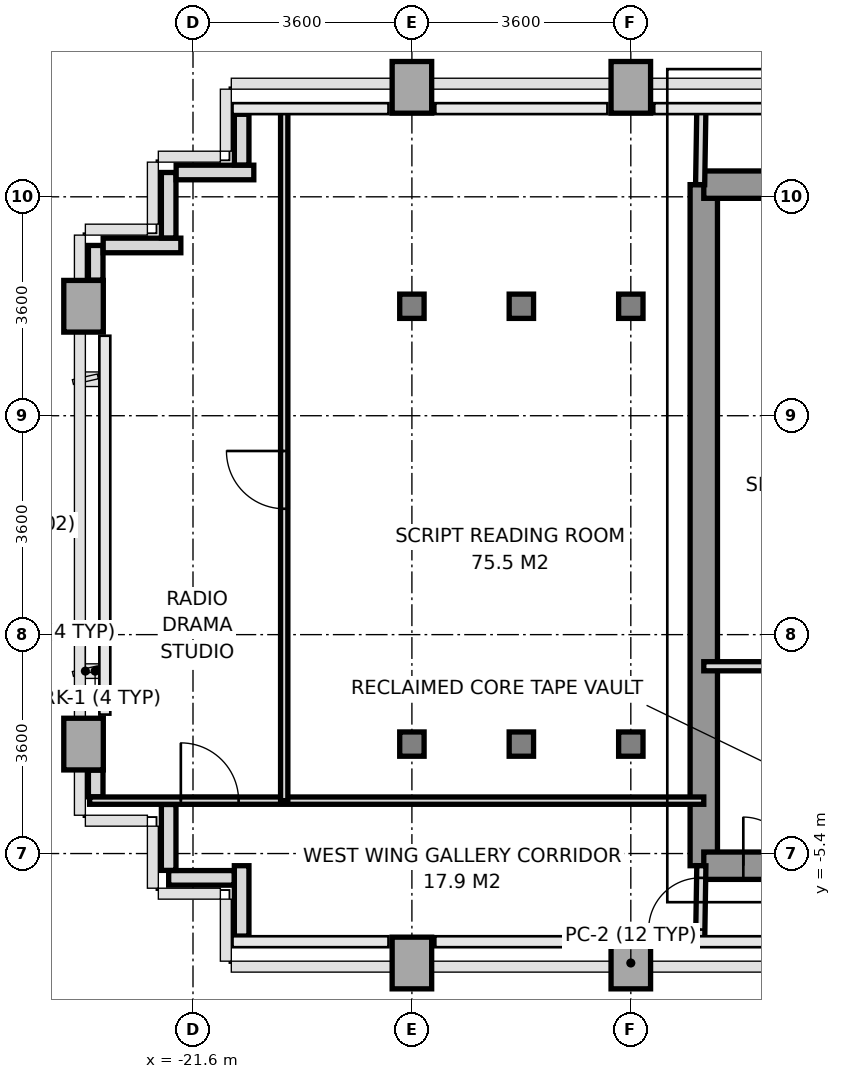
"""IFC4 building model, lengths in metres.
Left out: names, types, materials, properties, quantities, classifications, styles, units other than length and angle.
Written with IfcOpenShell. Run it as: python <this file> out.ifc"""

import sys

from ifc_helpers import new_model, si_unit, direction, frame, frame_2d, origin, origin_2d, place, context, subcontext, project, spatial, rectangle, i_section, extrude, source, transform, mapped, element, fill, save


model = new_model("IFC4")
c1 = context("Model", 3, precision=1e-05, world=origin(), true_north=direction((0.0, 1.0)))
c2 = subcontext(c1, "Body", "Model", "MODEL_VIEW")
j1 = project(units=[si_unit("LENGTHUNIT", "METRE"), si_unit("PLANEANGLEUNIT", "RADIAN")], contexts=[c1])
p1 = place(None, origin())
s1 = spatial("IfcSite", under=j1, at=p1, CompositionType="ELEMENT")
p2 = place(p1, origin())
s2 = spatial("IfcBuilding", under=s1, at=p2, CompositionType="ELEMENT")
p3 = place(p2, frame((0.0, 0.0, 114.2)))
s3 = spatial("IfcBuildingStorey", under=s2, at=p3, CompositionType="ELEMENT", Elevation=114.2)
m1 = source(origin(), c2, "Body", "SweptSolid", [
    extrude(rectangle(XDim=0.65, YDim=0.85, at=origin_2d()), origin(), (0.0, 0.0, 1.0), 3.2),
])
for number, where, z_axis, x_axis in (
    (1, (-23.4, -3.6, 0.0), (0.0, 0.0, 1.0), (1.0, 0.0, 0.0)),
    (2, (-23.4, 3.6, 0.0), (0.0, 0.0, 1.0), (1.0, 0.0, 0.0)),
    (3, (-18.0, -7.2, 0.0), (0.0, 0.0, 1.0), (1.0, 0.0, 0.0)),
):
    element("IfcColumn", number, at=place(p3, frame(where, z_axis=z_axis, x_axis=x_axis)), inside=s3, PredefinedType="COLUMN", context=c2, shape_type="MappedRepresentation", body=[
        mapped(m1, transform((0.0, 0.0, 0.0), x_axis=(1.0, 0.0, 0.0), y_axis=(0.0, 1.0, 0.0), z_axis=(0.0, 0.0, 1.0), scale=1.0)),
    ])
m2 = source(origin(), c2, "Body", "SweptSolid", [
    extrude(i_section(OverallWidth=0.401, OverallDepth=0.399, WebThickness=0.02, FlangeThickness=0.032, at=origin_2d()), origin(), (0.0, 0.0, 1.0), 3.2),
])
for number, where, z_axis, x_axis in (
    (4, (-18.0, -3.6, 0.0), (0.0, 0.0, 1.0), (1.0, 0.0, 0.0)),
    (5, (-18.0, 3.6, 0.0), (0.0, 0.0, 1.0), (1.0, 0.0, 0.0)),
):
    element("IfcColumn", number, at=place(p3, frame(where, z_axis=z_axis, x_axis=x_axis)), inside=s3, PredefinedType="COLUMN", context=c2, shape_type="MappedRepresentation", body=[
        mapped(m2, transform((0.0, 0.0, 0.0), x_axis=(1.0, 0.0, 0.0), y_axis=(0.0, 1.0, 0.0), z_axis=(0.0, 0.0, 1.0), scale=1.0)),
    ])
p4 = place(p3, frame((-18.0, 7.2, 0.0), z_axis=(0.0, 0.0, 1.0), x_axis=(1.0, 0.0, 0.0)))
e6 = element("IfcColumn", 6, at=p4, inside=s3, PredefinedType="COLUMN", context=c2, shape_type="MappedRepresentation", body=[
    mapped(m1, transform((0.0, 0.0, 0.0), x_axis=(1.0, 0.0, 0.0), y_axis=(0.0, 1.0, 0.0), z_axis=(0.0, 0.0, 1.0), scale=1.0)),
])
for number, where, z_axis, x_axis in (
    (7, (-16.2, -3.6, 0.0), (0.0, 0.0, 1.0), (1.0, 0.0, 0.0)),
    (8, (-16.2, 3.6, 0.0), (0.0, 0.0, 1.0), (1.0, 0.0, 0.0)),
):
    element("IfcColumn", number, at=place(p3, frame(where, z_axis=z_axis, x_axis=x_axis)), inside=s3, PredefinedType="COLUMN", context=c2, shape_type="MappedRepresentation", body=[
        mapped(m2, transform((0.0, 0.0, 0.0), x_axis=(1.0, 0.0, 0.0), y_axis=(0.0, 1.0, 0.0), z_axis=(0.0, 0.0, 1.0), scale=1.0)),
    ])
p5 = place(p3, frame((-14.4, -7.2, 0.0), z_axis=(0.0, 0.0, 1.0), x_axis=(1.0, 0.0, 0.0)))
e9 = element("IfcColumn", 9, at=p5, inside=s3, PredefinedType="COLUMN", context=c2, shape_type="MappedRepresentation", body=[
    mapped(m1, transform((0.0, 0.0, 0.0), x_axis=(1.0, 0.0, 0.0), y_axis=(0.0, 1.0, 0.0), z_axis=(0.0, 0.0, 1.0), scale=1.0)),
])
for number, where, z_axis, x_axis in (
    (10, (-14.4, -3.6, 0.0), (0.0, 0.0, 1.0), (1.0, 0.0, 0.0)),
    (11, (-14.4, 3.6, 0.0), (0.0, 0.0, 1.0), (1.0, 0.0, 0.0)),
):
    element("IfcColumn", number, at=place(p3, frame(where, z_axis=z_axis, x_axis=x_axis)), inside=s3, PredefinedType="COLUMN", context=c2, shape_type="MappedRepresentation", body=[
        mapped(m2, transform((0.0, 0.0, 0.0), x_axis=(1.0, 0.0, 0.0), y_axis=(0.0, 1.0, 0.0), z_axis=(0.0, 0.0, 1.0), scale=1.0)),
    ])
p6 = place(p3, frame((-14.4, 7.2, 0.0), z_axis=(0.0, 0.0, 1.0), x_axis=(1.0, 0.0, 0.0)))
e12 = element("IfcColumn", 12, at=p6, inside=s3, PredefinedType="COLUMN", context=c2, shape_type="MappedRepresentation", body=[
    mapped(m1, transform((0.0, 0.0, 0.0), x_axis=(1.0, 0.0, 0.0), y_axis=(0.0, 1.0, 0.0), z_axis=(0.0, 0.0, 1.0), scale=1.0)),
])
p7 = place(p3, frame((-20.8, -6.757, 0.0), z_axis=(0.0, 0.0, 1.0), x_axis=(0.0, 1.0, 0.0)))
e13 = element("IfcWall", 13, at=p7, inside=s3, PredefinedType="PARAPET", context=c2, shape_type="SweptSolid", body=[
    extrude(rectangle(XDim=1.157, YDim=0.24, at=frame_2d((0.579, 0.0))), origin(), (0.0, 0.0, 1.0), 1.15),
])
p8 = place(p3, frame((-20.923, -5.8, 0.0), z_axis=(0.0, 0.0, 1.0), x_axis=(-1.0, 0.0, 0.0)))
e14 = element("IfcWall", 14, at=p8, inside=s3, PredefinedType="PARAPET", context=c2, shape_type="SweptSolid", body=[
    extrude(rectangle(XDim=1.077, YDim=0.24, at=frame_2d((0.539, 0.0))), origin(), (0.0, 0.0, 1.0), 1.15),
])
p9 = place(p3, frame((-22.0, -5.677, 0.0), z_axis=(0.0, 0.0, 1.0), x_axis=(0.0, 1.0, 0.0)))
e15 = element("IfcWall", 15, at=p9, inside=s3, PredefinedType="PARAPET", context=c2, shape_type="SweptSolid", body=[
    extrude(rectangle(XDim=1.084, YDim=0.24, at=frame_2d((0.542, 0.0))), origin(), (0.0, 0.0, 1.0), 1.15),
])
p10 = place(p3, frame((-23.2, -4.467, 0.0), z_axis=(0.0, 0.0, 1.0), x_axis=(0.0, 1.0, 0.0)))
e16 = element("IfcWall", 16, at=p10, inside=s3, PredefinedType="PARAPET", context=c2, shape_type="SweptSolid", body=[
    extrude(rectangle(XDim=0.439, YDim=0.24, at=frame_2d((0.219, 0.0))), origin(), (0.0, 0.0, 1.0), 1.15),
])
p11 = place(p3, frame((-23.2, 4.028, 0.0), z_axis=(0.0, 0.0, 1.0), x_axis=(0.0, 1.0, 0.0)))
e17 = element("IfcWall", 17, at=p11, inside=s3, PredefinedType="PARAPET", context=c2, shape_type="SweptSolid", body=[
    extrude(rectangle(XDim=0.572, YDim=0.24, at=frame_2d((0.286, 0.0))), origin(), (0.0, 0.0, 1.0), 1.15),
])
p12 = place(p3, frame((-23.077, 4.6, 0.0), z_axis=(0.0, 0.0, 1.0), x_axis=(1.0, 0.0, 0.0)))
e18 = element("IfcWall", 18, at=p12, inside=s3, PredefinedType="PARAPET", context=c2, shape_type="SweptSolid", body=[
    extrude(rectangle(XDim=1.277, YDim=0.24, at=frame_2d((0.638, 0.0))), origin(), (0.0, 0.0, 1.0), 1.15),
])
p13 = place(p3, frame((-22.0, 4.723, 0.0), z_axis=(0.0, 0.0, 1.0), x_axis=(0.0, 1.0, 0.0)))
e19 = element("IfcWall", 19, at=p13, inside=s3, PredefinedType="PARAPET", context=c2, shape_type="SweptSolid", body=[
    extrude(rectangle(XDim=1.077, YDim=0.24, at=frame_2d((0.539, 0.0))), origin(), (0.0, 0.0, 1.0), 1.15),
])
p14 = place(p3, frame((-21.877, 5.8, 0.0), z_axis=(0.0, 0.0, 1.0), x_axis=(1.0, 0.0, 0.0)))
e20 = element("IfcWall", 20, at=p14, inside=s3, PredefinedType="PARAPET", context=c2, shape_type="SweptSolid", body=[
    extrude(rectangle(XDim=1.277, YDim=0.24, at=frame_2d((0.638, 0.0))), origin(), (0.0, 0.0, 1.0), 1.15),
])
p15 = place(p3, frame((-20.8, 5.923, 0.0), z_axis=(0.0, 0.0, 1.0), x_axis=(0.0, 1.0, 0.0)))
e21 = element("IfcWall", 21, at=p15, inside=s3, PredefinedType="PARAPET", context=c2, shape_type="SweptSolid", body=[
    extrude(rectangle(XDim=0.834, YDim=0.24, at=frame_2d((0.417, 0.0))), origin(), (0.0, 0.0, 1.0), 1.15),
])
p16 = place(p3, frame((-13.2, -5.6, 0.0), z_axis=(0.0, 0.0, 1.0), x_axis=(0.0, 1.0, 0.0)))
e22 = element("IfcWall", 22, at=p16, inside=s3, PredefinedType="SHEAR", context=c2, shape_type="SweptSolid", body=[
    extrude(rectangle(XDim=11.2, YDim=0.45, at=frame_2d((5.6, 0.0))), origin(), (0.0, 0.0, 1.0), 3.2),
])
p17 = place(p3, frame((-13.2, 5.6, 0.0), z_axis=(0.0, 0.0, 1.0), x_axis=(1.0, 0.0, 0.0)))
e23 = element("IfcWall", 23, at=p17, inside=s3, PredefinedType="SHEAR", context=c2, shape_type="SweptSolid", body=[
    extrude(rectangle(XDim=1.819, YDim=0.45, at=frame_2d((0.909, 0.0))), origin(), (0.0, 0.0, 1.0), 3.2),
])
p18 = place(p3, frame((-13.2, -5.6, 0.0), z_axis=(0.0, 0.0, 1.0), x_axis=(1.0, 0.0, 0.0)))
e24 = element("IfcWall", 24, at=p18, inside=s3, PredefinedType="SHEAR", context=c2, shape_type="SweptSolid", body=[
    extrude(rectangle(XDim=7.8, YDim=0.45, at=frame_2d((3.9, 0.0))), origin(), (0.0, 0.0, 1.0), 3.2),
])
p19 = place(p18, frame((3.6, 0.0, 0.0)))
e25 = element("IfcOpeningElement", 25, at=p19, cuts=e24, PredefinedType="OPENING", context=c2, shape_type="SweptSolid", body=[
    extrude(rectangle(XDim=1.2, YDim=2.2, at=frame_2d((0.6, 1.1))), frame((0.0, 0.235, 0.0), z_axis=(0.0, -1.0, 0.0), x_axis=(1.0, 0.0, 0.0)), (0.0, 0.0, 1.0), 0.47),
])
p20 = place(p18, frame((0.65, 0.0, 0.0)))
e26 = element("IfcOpeningElement", 26, at=p20, cuts=e24, PredefinedType="OPENING", context=c2, shape_type="SweptSolid", body=[
    extrude(rectangle(XDim=0.8, YDim=2.1, at=frame_2d((0.4, 1.05))), frame((0.0, 0.235, 0.0), z_axis=(0.0, -1.0, 0.0), x_axis=(1.0, 0.0, 0.0)), (0.0, 0.0, 1.0), 0.47),
])
p21 = place(p3, frame((-13.2, -2.32, 0.0), z_axis=(0.0, 0.0, 1.0), x_axis=(1.0, 0.0, 0.0)))
e27 = element("IfcWall", 27, at=p21, inside=s3, PredefinedType="PARTITIONING", context=c2, shape_type="SweptSolid", body=[
    extrude(rectangle(XDim=2.18, YDim=0.15, at=frame_2d((1.09, 0.0))), origin(), (0.0, 0.0, 1.0), 3.2),
])
p22 = place(p3, frame((-13.26, 5.6, 0.0), z_axis=(0.0, 0.0, 1.0), x_axis=(0.016013571389, 0.999871774545, 0.0)))
e28 = element("IfcWall", 28, at=p22, inside=s3, PredefinedType="PARTITIONING", context=c2, shape_type="SweptSolid", body=[
    extrude(rectangle(XDim=1.25, YDim=0.15, at=frame_2d((0.625, 0.0))), origin(), (0.0, 0.0, 1.0), 3.2),
])
p23 = place(p3, frame((-13.26, -6.85, 0.0), z_axis=(0.0, 0.0, 1.0), x_axis=(0.016013571389, 0.999871774545, 0.0)))
e29 = element("IfcWall", 29, at=p23, inside=s3, PredefinedType="PARTITIONING", context=c2, shape_type="SweptSolid", body=[
    extrude(rectangle(XDim=1.25, YDim=0.15, at=frame_2d((0.625, 0.0))), origin(), (0.0, 0.0, 1.0), 3.2),
])
p24 = place(p23, frame((0.2, 0.0, 0.0)))
e30 = element("IfcOpeningElement", 30, at=p24, cuts=e29, PredefinedType="OPENING", context=c2, shape_type="SweptSolid", body=[
    extrude(rectangle(XDim=0.85, YDim=2.1, at=frame_2d((0.425, 1.05))), frame((0.0, 0.085, 0.0), z_axis=(0.0, -1.0, 0.0), x_axis=(1.0, 0.0, 0.0)), (0.0, 0.0, 1.0), 0.17),
])
p25 = place(p3, frame((-23.3, -4.53, 0.0), z_axis=(0.0, 0.0, 1.0), x_axis=(1.0, 0.0, 0.0)))
e31 = element("IfcWall", 31, at=p25, inside=s3, PredefinedType="PARTITIONING", context=c2, shape_type="SweptSolid", body=[
    extrude(rectangle(XDim=10.1, YDim=0.12, at=frame_2d((5.05, 0.0))), origin(), (0.0, 0.0, 1.0), 2.75),
])
p26 = place(p25, frame((1.5, 0.0, 0.0)))
e32 = element("IfcOpeningElement", 32, at=p26, cuts=e31, PredefinedType="OPENING", context=c2, shape_type="SweptSolid", body=[
    extrude(rectangle(XDim=0.95, YDim=2.15, at=frame_2d((0.475, 1.075))), frame((0.0, 0.07, 0.0), z_axis=(0.0, -1.0, 0.0), x_axis=(1.0, 0.0, 0.0)), (0.0, 0.0, 1.0), 0.14),
])
p27 = place(p3, frame((-20.1, -4.53, 0.0), z_axis=(0.0, 0.0, 1.0), x_axis=(0.0, 1.0, 0.0)))
e33 = element("IfcWall", 33, at=p27, inside=s3, PredefinedType="PARTITIONING", context=c2, shape_type="SweptSolid", body=[
    extrude(rectangle(XDim=11.38, YDim=0.12, at=frame_2d((5.69, 0.0))), origin(), (0.0, 0.0, 1.0), 2.7),
])
p28 = place(p27, frame((4.8, 0.0, 0.0)))
e34 = element("IfcOpeningElement", 34, at=p28, cuts=e33, PredefinedType="OPENING", context=c2, shape_type="SweptSolid", body=[
    extrude(rectangle(XDim=0.95, YDim=2.15, at=frame_2d((0.475, 1.075))), frame((0.0, 0.07, 0.0), z_axis=(0.0, -1.0, 0.0), x_axis=(1.0, 0.0, 0.0)), (0.0, 0.0, 1.0), 0.14),
])
m3 = source(origin(), c2, "Body", "SweptSolid", [
    extrude(rectangle(XDim=0.8, YDim=2.1, at=frame_2d((0.4, 1.05))), frame((0.0, 0.025, 0.0), z_axis=(0.0, -1.0, 0.0), x_axis=(1.0, 0.0, 0.0)), (0.0, 0.0, 1.0), 0.05),
])
p29 = place(p20, origin())
e35 = element("IfcDoor", 35, at=p29, inside=s3, OperationType="SINGLE_SWING_LEFT", PredefinedType="DOOR", context=c2, shape_type="MappedRepresentation", body=[
    mapped(m3, transform((0.0, 0.0, 0.0), x_axis=(1.0, 0.0, 0.0), y_axis=(0.0, 1.0, 0.0), z_axis=(0.0, 0.0, 1.0), scale=1.0)),
])
fill(e26, e35)
m4 = source(origin(), c2, "Body", "SweptSolid", [
    extrude(rectangle(XDim=0.85, YDim=2.1, at=frame_2d((0.425, 1.05))), frame((0.0, 0.025, 0.0), z_axis=(0.0, -1.0, 0.0), x_axis=(1.0, 0.0, 0.0)), (0.0, 0.0, 1.0), 0.05),
])
p30 = place(p24, origin())
e36 = element("IfcDoor", 36, at=p30, inside=s3, OperationType="SINGLE_SWING_LEFT", PredefinedType="DOOR", context=c2, shape_type="MappedRepresentation", body=[
    mapped(m4, transform((0.0, 0.0, 0.0), x_axis=(1.0, 0.0, 0.0), y_axis=(0.0, 1.0, 0.0), z_axis=(0.0, 0.0, 1.0), scale=1.0)),
])
fill(e30, e36)
m5 = source(origin(), c2, "Body", "SweptSolid", [
    extrude(rectangle(XDim=0.95, YDim=2.15, at=frame_2d((0.475, 1.075))), frame((0.0, 0.025, 0.0), z_axis=(0.0, -1.0, 0.0), x_axis=(1.0, 0.0, 0.0)), (0.0, 0.0, 1.0), 0.05),
])
p31 = place(p26, origin())
e37 = element("IfcDoor", 37, at=p31, inside=s3, OperationType="SINGLE_SWING_LEFT", PredefinedType="DOOR", context=c2, shape_type="MappedRepresentation", body=[
    mapped(m5, transform((0.0, 0.0, 0.0), x_axis=(1.0, 0.0, 0.0), y_axis=(0.0, 1.0, 0.0), z_axis=(0.0, 0.0, 1.0), scale=1.0)),
])
fill(e32, e37)
p32 = place(p28, origin())
e38 = element("IfcDoor", 38, at=p32, inside=s3, OperationType="SINGLE_SWING_RIGHT", PredefinedType="DOOR", context=c2, shape_type="MappedRepresentation", body=[
    mapped(m5, transform((0.0, 0.0, 0.0), x_axis=(1.0, 0.0, 0.0), y_axis=(0.0, 1.0, 0.0), z_axis=(0.0, 0.0, 1.0), scale=1.0)),
])
fill(e34, e38)
save(model, sys.argv[1])
